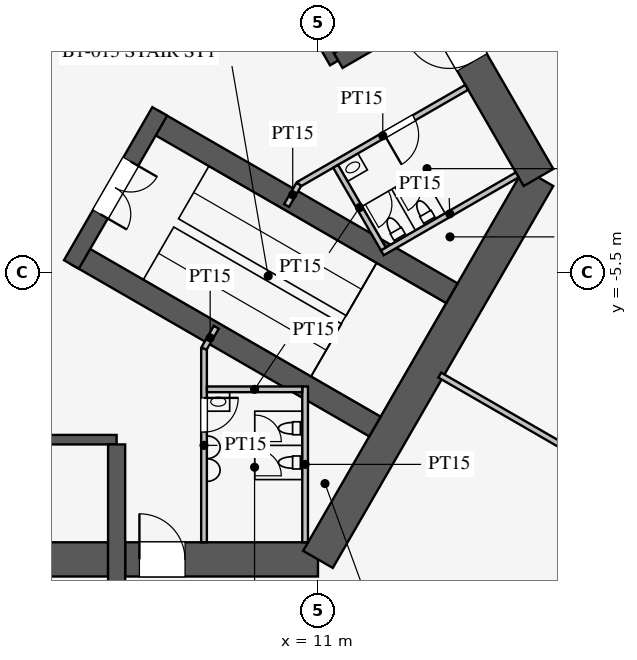
"""IFC4 building model, lengths in metres.
Left out: names, types, materials, properties, quantities, classifications, styles, units other than length and angle.
Written with IfcOpenShell. Run it as: python <this file> out.ifc"""

import sys

from ifc_helpers import new_model, si_unit, direction, frame, frame_2d, origin, place, context, subcontext, project, spatial, rectangle, extrude, element, fill, save


model = new_model("IFC4")
c1 = context("Model", 3, precision=1e-05, world=origin(), true_north=direction((0.0, 1.0)))
c2 = subcontext(c1, "Body", "Model", "MODEL_VIEW")
j1 = project(units=[si_unit("LENGTHUNIT", "METRE"), si_unit("PLANEANGLEUNIT", "RADIAN")], contexts=[c1])
p1 = place(None, origin())
s1 = spatial("IfcSite", under=j1, at=p1, CompositionType="ELEMENT")
p2 = place(p1, origin())
s2 = spatial("IfcBuilding", under=s1, at=p2, CompositionType="ELEMENT")
p3 = place(p2, frame((0.0, 0.0, -6.0)))
s3 = spatial("IfcBuildingStorey", under=s2, at=p3, CompositionType="ELEMENT", Elevation=-6.0)
p4 = place(p3, frame((3.075, -13.05, -0.3), z_axis=(0.0, 0.0, 1.0), x_axis=(1.0, 0.0, 0.0)))
e1 = element("IfcWall", 1, at=p4, inside=s3, PredefinedType="SHEAR", context=c2, shape_type="SweptSolid", body=[
    extrude(rectangle(XDim=2.4, YDim=0.9, at=frame_2d((1.2, 0.0))), origin(), (0.0, 0.0, 1.0), 6.3),
])
p5 = place(p3, frame((5.925, -13.05, -0.3), z_axis=(0.0, 0.0, 1.0), x_axis=(1.0, 0.0, 0.0)))
e2 = element("IfcWall", 2, at=p5, inside=s3, PredefinedType="SHEAR", context=c2, shape_type="SweptSolid", body=[
    extrude(rectangle(XDim=5.073, YDim=0.9, at=frame_2d((2.537, 0.0))), origin(), (0.0, 0.0, 1.0), 6.3),
])
p6 = place(p5, frame((0.375, 0.0, 0.3)))
e3 = element("IfcOpeningElement", 3, at=p6, cuts=e2, PredefinedType="OPENING", context=c2, shape_type="SweptSolid", body=[
    extrude(rectangle(XDim=1.2, YDim=2.1, at=frame_2d((0.6, 1.05))), frame((0.0, 0.46, 0.0), z_axis=(0.0, -1.0, 0.0), x_axis=(1.0, 0.0, 0.0)), (0.0, 0.0, 1.0), 0.92),
])
p7 = place(p3, frame((10.999, -13.05, -0.3), z_axis=(0.0, 0.0, 1.0), x_axis=(0.499990156827, 0.866031086669, 0.0)))
e4 = element("IfcWall", 4, at=p7, inside=s3, PredefinedType="SHEAR", context=c2, shape_type="SweptSolid", body=[
    extrude(rectangle(XDim=11.605, YDim=0.9, at=frame_2d((5.802, 0.0))), origin(), (0.0, 0.0, 1.0), 6.3),
])
p8 = place(p3, frame((16.801, -3.0, -0.3), z_axis=(0.0, 0.0, 1.0), x_axis=(-0.499979327182, 0.866037338912, 0.0)))
e5 = element("IfcWall", 5, at=p8, inside=s3, PredefinedType="SHEAR", context=c2, shape_type="SweptSolid", body=[
    extrude(rectangle(XDim=5.073, YDim=0.9, at=frame_2d((2.537, 0.0))), origin(), (0.0, 0.0, 1.0), 6.3),
])
p9 = place(p8, frame((3.499, 0.0, 0.3)))
e6 = element("IfcOpeningElement", 6, at=p9, cuts=e5, PredefinedType="OPENING", context=c2, shape_type="SweptSolid", body=[
    extrude(rectangle(XDim=1.2, YDim=2.1, at=frame_2d((0.6, 1.05))), frame((0.0, 0.46, 0.0), z_axis=(0.0, -1.0, 0.0), x_axis=(1.0, 0.0, 0.0)), (0.0, 0.0, 1.0), 0.92),
])
p10 = place(p3, frame((-5.7, -9.9, -0.3), z_axis=(0.0, 0.0, 1.0), x_axis=(1.0, 0.0, 0.0)))
e7 = element("IfcWall", 7, at=p10, inside=s3, PredefinedType="SHEAR", context=c2, shape_type="SweptSolid", body=[
    extrude(rectangle(XDim=11.4, YDim=0.25, at=frame_2d((5.7, 0.0))), origin(), (0.0, 0.0, 1.0), 6.3),
])
p11 = place(p3, frame((5.7, -10.025, -0.3), z_axis=(0.0, 0.0, 1.0), x_axis=(0.0, -1.0, 0.0)))
e8 = element("IfcWall", 8, at=p11, inside=s3, PredefinedType="SHEAR", context=c2, shape_type="SweptSolid", body=[
    extrude(rectangle(XDim=4.575, YDim=0.45, at=frame_2d((2.288, 0.0))), origin(), (0.0, 0.0, 1.0), 6.3),
])
p12 = place(p3, frame((11.424, 0.014, -0.3), z_axis=(0.0, 0.0, 1.0), x_axis=(-0.500001763848, 0.866024385424, 0.0)))
e9 = element("IfcWall", 9, at=p12, inside=s3, PredefinedType="SHEAR", context=c2, shape_type="SweptSolid", body=[
    extrude(rectangle(XDim=11.4, YDim=0.25, at=frame_2d((5.7, 0.0))), origin(), (0.0, 0.0, 1.0), 6.3),
])
p13 = place(p3, frame((11.532, 0.076, -0.3), z_axis=(0.0, 0.0, 1.0), x_axis=(0.86600784526, 0.500030411023, 0.0)))
e10 = element("IfcWall", 10, at=p13, inside=s3, PredefinedType="SHEAR", context=c2, shape_type="SweptSolid", body=[
    extrude(rectangle(XDim=4.575, YDim=0.45, at=frame_2d((2.288, 0.0))), origin(), (0.0, 0.0, 1.0), 6.3),
])
for number, where, z_axis, x_axis in (
    (11, (4.638, -5.016, -0.3), (0.0, 0.0, 1.0), (0.866, -0.5, 0.0)),
    (12, (6.663, -1.509, -0.3), (0.0, 0.0, 1.0), (0.866, -0.5, 0.0)),
):
    element("IfcWall", number, at=place(p3, frame(where, z_axis=z_axis, x_axis=x_axis)), inside=s3, PredefinedType="SHEAR", context=c2, shape_type="SweptSolid", body=[
        extrude(rectangle(XDim=9.075, YDim=0.6, at=frame_2d((4.538, 0.0))), origin(), (0.0, 0.0, 1.0), 6.3),
    ])
p14 = place(p3, frame((4.51, -5.289, -0.3), z_axis=(0.0, 0.0, 1.0), x_axis=(0.499984536904, 0.866034331223, 0.0)))
e13 = element("IfcWall", 13, at=p14, inside=s3, PredefinedType="SHEAR", context=c2, shape_type="SweptSolid", body=[
    extrude(rectangle(XDim=4.65, YDim=0.45, at=frame_2d((2.325, 0.0))), origin(), (0.0, 0.0, 1.0), 6.3),
])
p15 = place(p14, frame((1.525, 0.0, 0.3)))
e14 = element("IfcOpeningElement", 14, at=p15, cuts=e13, PredefinedType="OPENING", context=c2, shape_type="SweptSolid", body=[
    extrude(rectangle(XDim=1.6, YDim=2.1, at=frame_2d((0.8, 1.05))), frame((0.0, 0.235, 0.0), z_axis=(0.0, -1.0, 0.0), x_axis=(1.0, 0.0, 0.0)), (0.0, 0.0, 1.0), 0.47),
])
p16 = place(p3, frame((8.0, -7.5, 0.0), z_axis=(0.0, 0.0, 1.0), x_axis=(0.0, -1.0, 0.0)))
e15 = element("IfcWall", 15, at=p16, inside=s3, PredefinedType="PARTITIONING", context=c2, shape_type="SweptSolid", body=[
    extrude(rectangle(XDim=5.1, YDim=0.15, at=frame_2d((2.55, 0.0))), origin(), (0.0, 0.0, 1.0), 5.7),
])
p17 = place(p16, frame((1.3, 0.0, 0.0)))
e16 = element("IfcOpeningElement", 16, at=p17, cuts=e15, PredefinedType="OPENING", context=c2, shape_type="SweptSolid", body=[
    extrude(rectangle(XDim=0.9, YDim=2.1, at=frame_2d((0.45, 1.05))), frame((0.0, 0.085, 0.0), z_axis=(0.0, -1.0, 0.0), x_axis=(1.0, 0.0, 0.0)), (0.0, 0.0, 1.0), 0.17),
])
p18 = place(p3, frame((10.495, -3.178, 0.0), z_axis=(0.0, 0.0, 1.0), x_axis=(0.86602216432, 0.500005610874, 0.0)))
e17 = element("IfcWall", 17, at=p18, inside=s3, PredefinedType="PARTITIONING", context=c2, shape_type="SweptSolid", body=[
    extrude(rectangle(XDim=5.1, YDim=0.15, at=frame_2d((2.55, 0.0))), origin(), (0.0, 0.0, 1.0), 5.7),
])
p19 = place(p18, frame((2.6, 0.0, 0.0)))
e18 = element("IfcOpeningElement", 18, at=p19, cuts=e17, PredefinedType="OPENING", context=c2, shape_type="SweptSolid", body=[
    extrude(rectangle(XDim=0.9, YDim=2.1, at=frame_2d((0.45, 1.05))), frame((0.0, 0.085, 0.0), z_axis=(0.0, -1.0, 0.0), x_axis=(1.0, 0.0, 0.0)), (0.0, 0.0, 1.0), 0.17),
])
for number, where, z_axis, x_axis in (
    (19, (8.0, -7.5, 0.0), (0.0, 0.0, 1.0), (0.5, 0.866, 0.0)),
    (20, (10.495, -3.178, 0.0), (0.0, 0.0, 1.0), (-0.5, -0.866, 0.0)),
):
    element("IfcWall", number, at=place(p3, frame(where, z_axis=z_axis, x_axis=x_axis)), inside=s3, PredefinedType="PARTITIONING", context=c2, shape_type="SweptSolid", body=[
        extrude(rectangle(XDim=0.645, YDim=0.15, at=frame_2d((0.323, 0.0))), origin(), (0.0, 0.0, 1.0), 5.7),
    ])
p20 = place(p3, frame((10.66, -8.5, 0.0), z_axis=(0.0, 0.0, 1.0), x_axis=(0.0, -1.0, 0.0)))
e21 = element("IfcWall", 21, at=p20, inside=s3, PredefinedType="PARTITIONING", context=c2, shape_type="SweptSolid", body=[
    extrude(rectangle(XDim=4.1, YDim=0.15, at=frame_2d((2.05, 0.0))), origin(), (0.0, 0.0, 1.0), 5.7),
])
p21 = place(p3, frame((8.075, -8.575, 0.0), z_axis=(0.0, 0.0, 1.0), x_axis=(1.0, 0.0, 0.0)))
e22 = element("IfcWall", 22, at=p21, inside=s3, PredefinedType="PARTITIONING", context=c2, shape_type="SweptSolid", body=[
    extrude(rectangle(XDim=2.51, YDim=0.15, at=frame_2d((1.255, 0.0))), origin(), (0.0, 0.0, 1.0), 5.7),
])
p22 = place(p3, frame((12.691, -4.982, 0.0), z_axis=(0.0, 0.0, 1.0), x_axis=(0.8660249478, 0.500000789788, 0.0)))
e23 = element("IfcWall", 23, at=p22, inside=s3, PredefinedType="PARTITIONING", context=c2, shape_type="SweptSolid", body=[
    extrude(rectangle(XDim=4.1, YDim=0.15, at=frame_2d((2.05, 0.0))), origin(), (0.0, 0.0, 1.0), 5.7),
])
p23 = place(p3, frame((11.464, -2.706, 0.0), z_axis=(0.0, 0.0, 1.0), x_axis=(0.50001992892, -0.866013897511, 0.0)))
e24 = element("IfcWall", 24, at=p23, inside=s3, PredefinedType="PARTITIONING", context=c2, shape_type="SweptSolid", body=[
    extrude(rectangle(XDim=2.51, YDim=0.15, at=frame_2d((1.255, 0.0))), origin(), (0.0, 0.0, 1.0), 5.7),
])
p24 = place(p3, frame((14.203, -8.2, 0.0), z_axis=(0.0, 0.0, 1.0), x_axis=(0.866024965723, -0.500000758745, 0.0)))
e25 = element("IfcWall", 25, at=p24, inside=s3, PredefinedType="PARTITIONING", context=c2, shape_type="SweptSolid", body=[
    extrude(rectangle(XDim=18.25, YDim=0.15, at=frame_2d((9.125, 0.0))), origin(), (0.0, 0.0, 1.0), 3.7),
])
p25 = place(p17, origin())
e26 = element("IfcDoor", 26, at=p25, inside=s3, OperationType="SINGLE_SWING_LEFT", PredefinedType="DOOR", context=c2, shape_type="SweptSolid", body=[
    extrude(rectangle(XDim=0.9, YDim=2.1, at=frame_2d((0.45, 1.05))), frame((0.0, 0.025, 0.0), z_axis=(0.0, -1.0, 0.0), x_axis=(1.0, 0.0, 0.0)), (0.0, 0.0, 1.0), 0.05),
])
fill(e16, e26)
p26 = place(p19, frame((0.9, 0.0, 0.0), z_axis=(0.0, 0.0, 1.0), x_axis=(-1.0, 0.0, 0.0)))
e27 = element("IfcDoor", 27, at=p26, inside=s3, OperationType="SINGLE_SWING_RIGHT", PredefinedType="DOOR", context=c2, shape_type="SweptSolid", body=[
    extrude(rectangle(XDim=0.9, YDim=2.1, at=frame_2d((0.45, 1.05))), frame((0.0, 0.025, 0.0), z_axis=(0.0, -1.0, 0.0), x_axis=(1.0, 0.0, 0.0)), (0.0, 0.0, 1.0), 0.05),
])
fill(e18, e27)
p27 = place(p15, frame((1.6, 0.0, 0.0), z_axis=(0.0, 0.0, 1.0), x_axis=(-1.0, 0.0, 0.0)))
e28 = element("IfcDoor", 28, at=p27, inside=s3, OperationType="DOUBLE_DOOR_SINGLE_SWING", PredefinedType="DOOR", context=c2, shape_type="SweptSolid", body=[
    extrude(rectangle(XDim=1.6, YDim=2.1, at=frame_2d((0.8, 1.05))), frame((0.0, 0.025, 0.0), z_axis=(0.0, -1.0, 0.0), x_axis=(1.0, 0.0, 0.0)), (0.0, 0.0, 1.0), 0.05),
])
fill(e14, e28)
p28 = place(p6, origin())
e29 = element("IfcDoor", 29, at=p28, inside=s3, OperationType="SINGLE_SWING_LEFT", PredefinedType="DOOR", context=c2, shape_type="SweptSolid", body=[
    extrude(rectangle(XDim=1.2, YDim=2.1, at=frame_2d((0.6, 1.05))), frame((0.0, 0.025, 0.0), z_axis=(0.0, -1.0, 0.0), x_axis=(1.0, 0.0, 0.0)), (0.0, 0.0, 1.0), 0.05),
])
fill(e3, e29)
p29 = place(p9, origin())
e30 = element("IfcDoor", 30, at=p29, inside=s3, OperationType="SINGLE_SWING_RIGHT", PredefinedType="DOOR", context=c2, shape_type="SweptSolid", body=[
    extrude(rectangle(XDim=1.2, YDim=2.1, at=frame_2d((0.6, 1.05))), frame((0.0, 0.025, 0.0), z_axis=(0.0, -1.0, 0.0), x_axis=(1.0, 0.0, 0.0)), (0.0, 0.0, 1.0), 0.05),
])
fill(e6, e30)
save(model, sys.argv[1])
